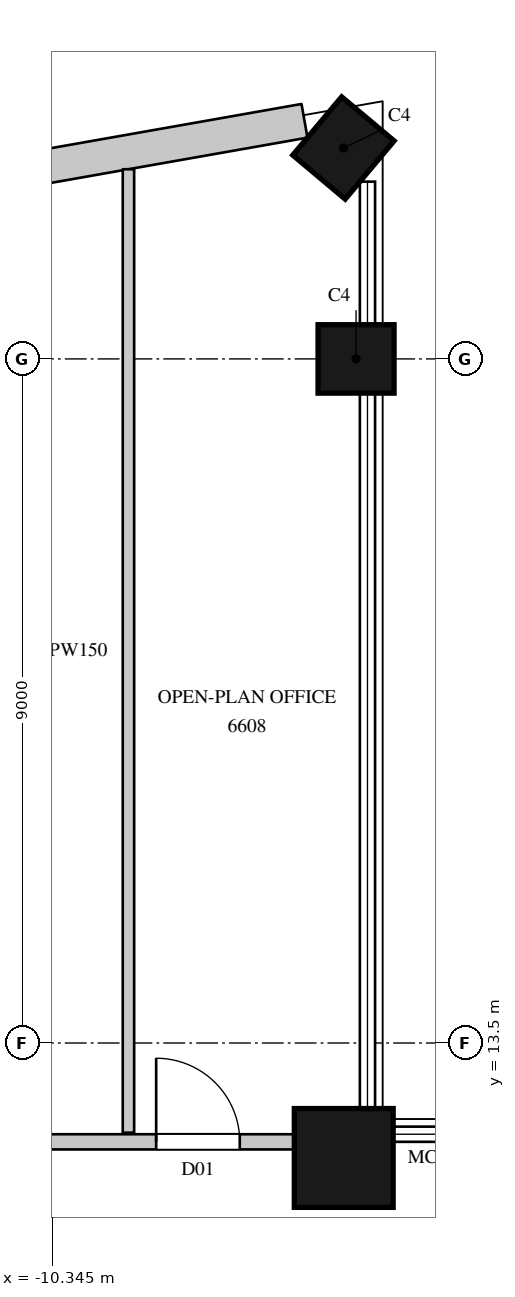
"""IFC4 building model, lengths in metres.
Left out: names, types, materials, properties, quantities, classifications, styles, units other than length and angle.
Written with IfcOpenShell. Run it as: python <this file> out.ifc"""

import sys

from ifc_helpers import new_model, si_unit, direction, frame, frame_2d, origin, origin_2d, place, context, subcontext, project, spatial, rectangle, circle, extrude, element, fill, save


model = new_model("IFC4")
c1 = context("Model", 3, precision=1e-05, world=origin(), true_north=direction((0.0, 1.0)))
c2 = subcontext(c1, "Body", "Model", "MODEL_VIEW")
j1 = project(units=[si_unit("LENGTHUNIT", "METRE"), si_unit("PLANEANGLEUNIT", "RADIAN")], contexts=[c1])
p1 = place(None, origin())
s1 = spatial("IfcSite", under=j1, at=p1, CompositionType="ELEMENT")
p2 = place(p1, origin())
s2 = spatial("IfcBuilding", under=s1, at=p2, CompositionType="ELEMENT")
p3 = place(p2, frame((0.0, 0.0, 292.6)))
s3 = spatial("IfcBuildingStorey", under=s2, at=p3, CompositionType="ELEMENT", Elevation=292.6)
p4 = place(p3, frame((-6.512, 11.988, 0.0), z_axis=(0.0, 0.0, 1.0), x_axis=(1.0, 0.0, 0.0)))
e1 = element("IfcColumn", 1, at=p4, inside=s3, PredefinedType="COLUMN", context=c2, shape_type="SweptSolid", body=[
    extrude(circle(Radius=0.65, at=origin_2d()), origin(), (0.0, 0.0, 1.0), 4.1),
])
for number, where, z_axis, x_axis in (
    (2, (-6.35, 22.5, 0.0), (0.0, 0.0, 1.0), (0.0, 1.0, 0.0)),
    (3, (-6.516, 25.275, 0.0), (0.0, 0.0, 1.0), (-0.766, 0.643, 0.0)),
):
    element("IfcColumn", number, at=place(p3, frame(where, z_axis=z_axis, x_axis=x_axis)), inside=s3, PredefinedType="COLUMN", context=c2, shape_type="SweptSolid", body=[
        extrude(rectangle(XDim=0.9, YDim=1.0, at=origin_2d()), origin(), (0.0, 0.0, 1.0), 4.1),
    ])
p5 = place(p3, frame((-7.029, 25.632, 0.0), z_axis=(0.0, 0.0, 1.0), x_axis=(-0.984797606634, -0.173705710808, 0.0)))
e4 = element("IfcWall", 4, at=p5, inside=s3, PredefinedType="SOLIDWALL", context=c2, shape_type="SweptSolid", body=[
    extrude(rectangle(XDim=5.772, YDim=0.45, at=frame_2d((2.886, 0.0))), origin(), (0.0, 0.0, 1.0), 3.8),
])
p6 = place(p5, frame((3.593, 0.0, 1.05)))
e5 = element("IfcOpeningElement", 5, at=p6, cuts=e4, PredefinedType="OPENING", context=c2, shape_type="SweptSolid", body=[
    extrude(rectangle(XDim=1.8, YDim=2.4, at=frame_2d((0.9, 1.2))), frame((0.0, 0.235, 0.0), z_axis=(0.0, -1.0, 0.0), x_axis=(1.0, 0.0, 0.0)), (0.0, 0.0, 1.0), 0.47),
])
p7 = place(p3, frame((-10.88, 12.2, 0.0), z_axis=(0.0, 0.0, 1.0), x_axis=(1.0, 0.0, 0.0)))
e6 = element("IfcWall", 6, at=p7, inside=s3, PredefinedType="PARTITIONING", context=c2, shape_type="SweptSolid", body=[
    extrude(rectangle(XDim=3.736, YDim=0.2, at=frame_2d((1.868, 0.0))), origin(), (0.0, 0.0, 1.0), 3.8),
])
p8 = place(p7, frame((1.9, 0.0, 0.0)))
e7 = element("IfcOpeningElement", 7, at=p8, cuts=e6, PredefinedType="OPENING", context=c2, shape_type="SweptSolid", body=[
    extrude(rectangle(XDim=1.1, YDim=2.4, at=frame_2d((0.55, 1.2))), frame((0.0, 0.11, 0.0), z_axis=(0.0, -1.0, 0.0), x_axis=(1.0, 0.0, 0.0)), (0.0, 0.0, 1.0), 0.22),
])
p9 = place(p3, frame((-9.344, 12.32, 0.0), z_axis=(0.0, 0.0, 1.0), x_axis=(0.0, 1.0, 0.0)))
e8 = element("IfcWall", 8, at=p9, inside=s3, PredefinedType="PARTITIONING", context=c2, shape_type="SweptSolid", body=[
    extrude(rectangle(XDim=12.675, YDim=0.15, at=frame_2d((6.338, 0.0))), origin(), (0.0, 0.0, 1.0), 3.8),
])
p10 = place(p8, origin())
e9 = element("IfcDoor", 9, at=p10, inside=s3, OperationType="SINGLE_SWING_LEFT", PredefinedType="DOOR", context=c2, shape_type="SweptSolid", body=[
    extrude(rectangle(XDim=1.1, YDim=2.4, at=frame_2d((0.55, 1.2))), frame((0.0, 0.025, 0.0), z_axis=(0.0, -1.0, 0.0), x_axis=(1.0, 0.0, 0.0)), (0.0, 0.0, 1.0), 0.05),
])
fill(e7, e9)
save(model, sys.argv[1])
